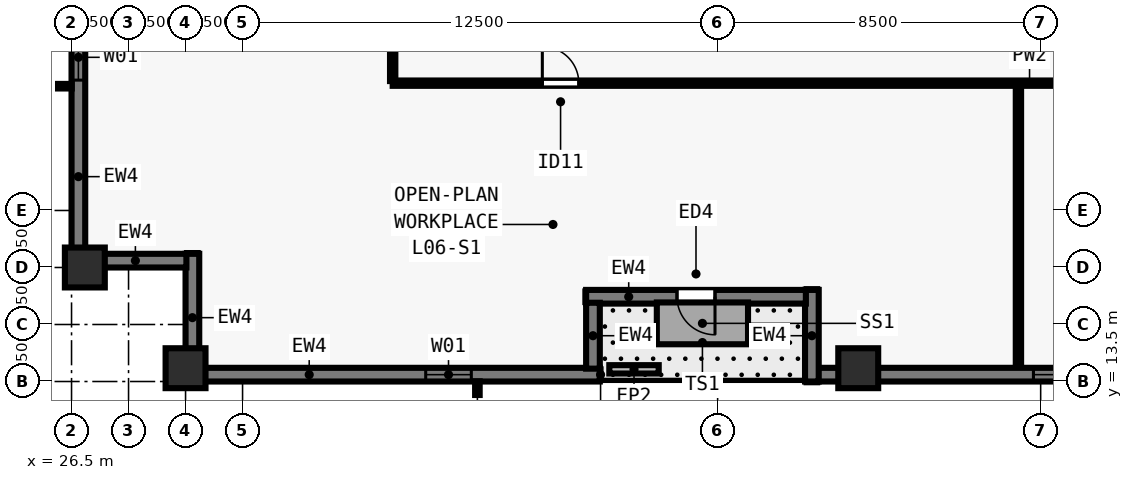
"""IFC4 building model, lengths in metres.
Left out: names, types, materials, properties, quantities, classifications, styles, units other than length and angle.
Written with IfcOpenShell. Run it as: python <this file> out.ifc"""

import sys

from ifc_helpers import new_model, si_unit, direction, frame, frame_2d, origin, origin_2d, place, context, subcontext, project, spatial, rectangle, extrude, element, fill, save


model = new_model("IFC4")
c1 = context("Model", 3, precision=1e-05, world=origin(), true_north=direction((0.0, 1.0)))
c2 = subcontext(c1, "Body", "Model", "MODEL_VIEW")
j1 = project(units=[si_unit("LENGTHUNIT", "METRE"), si_unit("PLANEANGLEUNIT", "RADIAN")], contexts=[c1])
p1 = place(None, origin())
s1 = spatial("IfcSite", under=j1, at=p1, CompositionType="ELEMENT")
p2 = place(p1, origin())
s2 = spatial("IfcBuilding", under=s1, at=p2, CompositionType="ELEMENT")
p3 = place(p2, frame((0.0, 0.0, 27.0)))
s3 = spatial("IfcBuildingStorey", under=s2, at=p3, CompositionType="ELEMENT", Elevation=27.0)
for number, where, z_axis, x_axis in (
    (1, (29.5, 13.85, 0.0), (0.0, 0.0, 1.0), (1.0, 0.0, 0.0)),
    (2, (47.2, 13.85, 0.0), (0.0, 0.0, 1.0), (1.0, 0.0, 0.0)),
    (3, (26.85, 16.5, 0.0), (0.0, 0.0, 1.0), (0.0, 1.0, 0.0)),
):
    element("IfcColumn", number, at=place(p3, frame(where, z_axis=z_axis, x_axis=x_axis)), inside=s3, PredefinedType="COLUMN", context=c2, shape_type="SweptSolid", body=[
        extrude(rectangle(XDim=1.05, YDim=1.05, at=origin_2d()), origin(), (0.0, 0.0, 1.0), 3.5),
    ])
p4 = place(p3, frame((40.4, 13.68, 0.0), z_axis=(0.0, 0.0, 1.0), x_axis=(-1.0, 0.0, 0.0)))
e4 = element("IfcWall", 4, at=p4, inside=s3, PredefinedType="SOLIDWALL", context=c2, shape_type="SweptSolid", body=[
    extrude(rectangle(XDim=10.562, YDim=0.36, at=frame_2d((5.281, 0.0))), origin(), (0.0, 0.0, 1.0), 3.28),
])
p5 = place(p4, frame((3.381, 0.0, 0.8)))
e5 = element("IfcOpeningElement", 5, at=p5, cuts=e4, PredefinedType="OPENING", context=c2, shape_type="SweptSolid", body=[
    extrude(rectangle(XDim=1.2, YDim=1.544, at=frame_2d((0.6, 0.772))), frame((0.0, 0.19, 0.0), z_axis=(0.0, -1.0, 0.0), x_axis=(1.0, 0.0, 0.0)), (0.0, 0.0, 1.0), 0.38),
])
p6 = place(p3, frame((29.68, 13.5, 0.0), z_axis=(0.0, 0.0, 1.0), x_axis=(0.0, 1.0, 0.0)))
e6 = element("IfcWall", 6, at=p6, inside=s3, PredefinedType="SOLIDWALL", context=c2, shape_type="SweptSolid", body=[
    extrude(rectangle(XDim=3.36, YDim=0.36, at=frame_2d((1.68, 0.0))), origin(), (0.0, 0.0, 1.0), 3.28),
])
p7 = place(p3, frame((29.522, 16.68, 0.0), z_axis=(0.0, 0.0, 1.0), x_axis=(-1.0, 0.0, 0.0)))
e7 = element("IfcWall", 7, at=p7, inside=s3, PredefinedType="SOLIDWALL", context=c2, shape_type="SweptSolid", body=[
    extrude(rectangle(XDim=2.684, YDim=0.36, at=frame_2d((1.342, 0.0))), origin(), (0.0, 0.0, 1.0), 3.28),
])
p8 = place(p3, frame((26.68, 16.5, 0.0), z_axis=(0.0, 0.0, 1.0), x_axis=(0.0, 1.0, 0.0)))
e8 = element("IfcWall", 8, at=p8, inside=s3, PredefinedType="SOLIDWALL", context=c2, shape_type="SweptSolid", body=[
    extrude(rectangle(XDim=44.662, YDim=0.36, at=frame_2d((22.331, 0.0))), origin(), (0.0, 0.0, 1.0), 3.28),
])
p9 = place(p8, frame((4.93, 0.0, 0.8)))
e9 = element("IfcOpeningElement", 9, at=p9, cuts=e8, PredefinedType="OPENING", context=c2, shape_type="SweptSolid", body=[
    extrude(rectangle(XDim=1.2, YDim=1.544, at=frame_2d((0.6, 0.772))), frame((0.0, 0.19, 0.0), z_axis=(0.0, -1.0, 0.0), x_axis=(1.0, 0.0, 0.0)), (0.0, 0.0, 1.0), 0.38),
])
p10 = place(p8, frame((8.14, 0.0, 0.8)))
e10 = element("IfcOpeningElement", 10, at=p10, cuts=e8, PredefinedType="OPENING", context=c2, shape_type="SweptSolid", body=[
    extrude(rectangle(XDim=1.5, YDim=1.544, at=frame_2d((0.75, 0.772))), frame((0.0, 0.19, 0.0), z_axis=(0.0, -1.0, 0.0), x_axis=(1.0, 0.0, 0.0)), (0.0, 0.0, 1.0), 0.38),
])
p11 = place(p8, frame((11.65, 0.0, 0.8)))
e11 = element("IfcOpeningElement", 11, at=p11, cuts=e8, PredefinedType="OPENING", context=c2, shape_type="SweptSolid", body=[
    extrude(rectangle(XDim=1.2, YDim=1.544, at=frame_2d((0.6, 0.772))), frame((0.0, 0.19, 0.0), z_axis=(0.0, -1.0, 0.0), x_axis=(1.0, 0.0, 0.0)), (0.0, 0.0, 1.0), 0.38),
])
p12 = place(p8, frame((14.411, 0.0, 0.8)))
e12 = element("IfcOpeningElement", 12, at=p12, cuts=e8, PredefinedType="OPENING", context=c2, shape_type="SweptSolid", body=[
    extrude(rectangle(XDim=1.5, YDim=1.544, at=frame_2d((0.75, 0.772))), frame((0.0, 0.19, 0.0), z_axis=(0.0, -1.0, 0.0), x_axis=(1.0, 0.0, 0.0)), (0.0, 0.0, 1.0), 0.38),
])
p13 = place(p8, frame((18.821, 0.0, 0.8)))
e13 = element("IfcOpeningElement", 13, at=p13, cuts=e8, PredefinedType="OPENING", context=c2, shape_type="SweptSolid", body=[
    extrude(rectangle(XDim=1.2, YDim=1.544, at=frame_2d((0.6, 0.772))), frame((0.0, 0.19, 0.0), z_axis=(0.0, -1.0, 0.0), x_axis=(1.0, 0.0, 0.0)), (0.0, 0.0, 1.0), 0.38),
])
p14 = place(p8, frame((21.581, 0.0, 0.8)))
e14 = element("IfcOpeningElement", 14, at=p14, cuts=e8, PredefinedType="OPENING", context=c2, shape_type="SweptSolid", body=[
    extrude(rectangle(XDim=1.5, YDim=1.544, at=frame_2d((0.75, 0.772))), frame((0.0, 0.19, 0.0), z_axis=(0.0, -1.0, 0.0), x_axis=(1.0, 0.0, 0.0)), (0.0, 0.0, 1.0), 0.38),
])
p15 = place(p8, frame((25.091, 0.0, 0.8)))
e15 = element("IfcOpeningElement", 15, at=p15, cuts=e8, PredefinedType="OPENING", context=c2, shape_type="SweptSolid", body=[
    extrude(rectangle(XDim=1.2, YDim=1.544, at=frame_2d((0.6, 0.772))), frame((0.0, 0.19, 0.0), z_axis=(0.0, -1.0, 0.0), x_axis=(1.0, 0.0, 0.0)), (0.0, 0.0, 1.0), 0.38),
])
p16 = place(p8, frame((29.151, 0.0, 0.8)))
e16 = element("IfcOpeningElement", 16, at=p16, cuts=e8, PredefinedType="OPENING", context=c2, shape_type="SweptSolid", body=[
    extrude(rectangle(XDim=1.5, YDim=1.544, at=frame_2d((0.75, 0.772))), frame((0.0, 0.19, 0.0), z_axis=(0.0, -1.0, 0.0), x_axis=(1.0, 0.0, 0.0)), (0.0, 0.0, 1.0), 0.38),
])
p17 = place(p8, frame((31.812, 0.0, 0.8)))
e17 = element("IfcOpeningElement", 17, at=p17, cuts=e8, PredefinedType="OPENING", context=c2, shape_type="SweptSolid", body=[
    extrude(rectangle(XDim=1.2, YDim=1.544, at=frame_2d((0.6, 0.772))), frame((0.0, 0.19, 0.0), z_axis=(0.0, -1.0, 0.0), x_axis=(1.0, 0.0, 0.0)), (0.0, 0.0, 1.0), 0.38),
])
p18 = place(p8, frame((35.022, 0.0, 0.8)))
e18 = element("IfcOpeningElement", 18, at=p18, cuts=e8, PredefinedType="OPENING", context=c2, shape_type="SweptSolid", body=[
    extrude(rectangle(XDim=1.5, YDim=1.544, at=frame_2d((0.75, 0.772))), frame((0.0, 0.19, 0.0), z_axis=(0.0, -1.0, 0.0), x_axis=(1.0, 0.0, 0.0)), (0.0, 0.0, 1.0), 0.38),
])
p19 = place(p8, frame((38.532, 0.0, 0.8)))
e19 = element("IfcOpeningElement", 19, at=p19, cuts=e8, PredefinedType="OPENING", context=c2, shape_type="SweptSolid", body=[
    extrude(rectangle(XDim=1.2, YDim=1.544, at=frame_2d((0.6, 0.772))), frame((0.0, 0.19, 0.0), z_axis=(0.0, -1.0, 0.0), x_axis=(1.0, 0.0, 0.0)), (0.0, 0.0, 1.0), 0.38),
])
p20 = place(p3, frame((74.5, 13.68, 0.0), z_axis=(0.0, 0.0, 1.0), x_axis=(-1.0, 0.0, 0.0)))
e20 = element("IfcWall", 20, at=p20, inside=s3, PredefinedType="SOLIDWALL", context=c2, shape_type="SweptSolid", body=[
    extrude(rectangle(XDim=28.362, YDim=0.36, at=frame_2d((14.181, 0.0))), origin(), (0.0, 0.0, 1.0), 3.28),
])
p21 = place(p20, frame((4.972, 0.0, 0.8)))
e21 = element("IfcOpeningElement", 21, at=p21, cuts=e20, PredefinedType="OPENING", context=c2, shape_type="SweptSolid", body=[
    extrude(rectangle(XDim=1.2, YDim=1.544, at=frame_2d((0.6, 0.772))), frame((0.0, 0.19, 0.0), z_axis=(0.0, -1.0, 0.0), x_axis=(1.0, 0.0, 0.0)), (0.0, 0.0, 1.0), 0.38),
])
p22 = place(p20, frame((8.265, 0.0, 0.8)))
e22 = element("IfcOpeningElement", 22, at=p22, cuts=e20, PredefinedType="OPENING", context=c2, shape_type="SweptSolid", body=[
    extrude(rectangle(XDim=1.5, YDim=1.544, at=frame_2d((0.75, 0.772))), frame((0.0, 0.19, 0.0), z_axis=(0.0, -1.0, 0.0), x_axis=(1.0, 0.0, 0.0)), (0.0, 0.0, 1.0), 0.38),
])
p23 = place(p20, frame((11.859, 0.0, 0.8)))
e23 = element("IfcOpeningElement", 23, at=p23, cuts=e20, PredefinedType="OPENING", context=c2, shape_type="SweptSolid", body=[
    extrude(rectangle(XDim=1.2, YDim=1.544, at=frame_2d((0.6, 0.772))), frame((0.0, 0.19, 0.0), z_axis=(0.0, -1.0, 0.0), x_axis=(1.0, 0.0, 0.0)), (0.0, 0.0, 1.0), 0.38),
])
p24 = place(p20, frame((15.153, 0.0, 0.8)))
e24 = element("IfcOpeningElement", 24, at=p24, cuts=e20, PredefinedType="OPENING", context=c2, shape_type="SweptSolid", body=[
    extrude(rectangle(XDim=1.5, YDim=1.544, at=frame_2d((0.75, 0.772))), frame((0.0, 0.19, 0.0), z_axis=(0.0, -1.0, 0.0), x_axis=(1.0, 0.0, 0.0)), (0.0, 0.0, 1.0), 0.38),
])
p25 = place(p20, frame((18.747, 0.0, 0.8)))
e25 = element("IfcOpeningElement", 25, at=p25, cuts=e20, PredefinedType="OPENING", context=c2, shape_type="SweptSolid", body=[
    extrude(rectangle(XDim=1.2, YDim=1.544, at=frame_2d((0.6, 0.772))), frame((0.0, 0.19, 0.0), z_axis=(0.0, -1.0, 0.0), x_axis=(1.0, 0.0, 0.0)), (0.0, 0.0, 1.0), 0.38),
])
p26 = place(p20, frame((21.19, 0.0, 0.8)))
e26 = element("IfcOpeningElement", 26, at=p26, cuts=e20, PredefinedType="OPENING", context=c2, shape_type="SweptSolid", body=[
    extrude(rectangle(XDim=1.5, YDim=1.544, at=frame_2d((0.75, 0.772))), frame((0.0, 0.19, 0.0), z_axis=(0.0, -1.0, 0.0), x_axis=(1.0, 0.0, 0.0)), (0.0, 0.0, 1.0), 0.38),
])
p27 = place(p3, frame((45.98, 13.5, 0.0), z_axis=(0.0, 0.0, 1.0), x_axis=(0.0, 1.0, 0.0)))
e27 = element("IfcWall", 27, at=p27, inside=s3, PredefinedType="SOLIDWALL", context=c2, shape_type="SweptSolid", body=[
    extrude(rectangle(XDim=2.41, YDim=0.36, at=frame_2d((1.205, 0.0))), origin(), (0.0, 0.0, 1.0), 3.28),
])
p28 = place(p3, frame((45.822, 15.73, 0.0), z_axis=(0.0, 0.0, 1.0), x_axis=(-1.0, 0.0, 0.0)))
e28 = element("IfcWall", 28, at=p28, inside=s3, PredefinedType="SOLIDWALL", context=c2, shape_type="SweptSolid", body=[
    extrude(rectangle(XDim=5.782, YDim=0.36, at=frame_2d((2.891, 0.0))), origin(), (0.0, 0.0, 1.0), 3.28),
])
p29 = place(p28, frame((2.391, 0.0, 0.0)))
e29 = element("IfcOpeningElement", 29, at=p29, cuts=e28, PredefinedType="OPENING", context=c2, shape_type="SweptSolid", body=[
    extrude(rectangle(XDim=1.0, YDim=2.15, at=frame_2d((0.5, 1.075))), frame((0.0, 0.19, 0.0), z_axis=(0.0, -1.0, 0.0), x_axis=(1.0, 0.0, 0.0)), (0.0, 0.0, 1.0), 0.38),
])
p30 = place(p3, frame((40.22, 15.572, 0.0), z_axis=(0.0, 0.0, 1.0), x_axis=(0.0, -1.0, 0.0)))
e30 = element("IfcWall", 30, at=p30, inside=s3, PredefinedType="SOLIDWALL", context=c2, shape_type="SweptSolid", body=[
    extrude(rectangle(XDim=1.734, YDim=0.36, at=frame_2d((0.867, 0.0))), origin(), (0.0, 0.0, 1.0), 3.28),
])
p31 = place(p3, frame((40.65, 13.82, 0.0), z_axis=(0.0, 0.0, 1.0), x_axis=(1.0, 0.0, 0.0)))
e31 = element("IfcWall", 31, at=p31, inside=s3, PredefinedType="PARAPET", context=c2, shape_type="SweptSolid", body=[
    extrude(rectangle(XDim=1.3, YDim=0.22, at=frame_2d((0.65, 0.0))), origin(), (0.0, 0.0, 1.0), 0.55),
])
p32 = place(p3, frame((34.95, 21.35, 0.0), z_axis=(0.0, 0.0, 1.0), x_axis=(1.0, 0.0, 0.0)))
e32 = element("IfcWall", 32, at=p32, inside=s3, PredefinedType="PARTITIONING", context=c2, shape_type="SweptSolid", body=[
    extrude(rectangle(XDim=34.1, YDim=0.14, at=frame_2d((17.05, 0.0))), origin(), (0.0, 0.0, 1.0), 3.28),
])
p33 = place(p32, frame((3.938, 0.0, 0.0)))
e33 = element("IfcOpeningElement", 33, at=p33, cuts=e32, PredefinedType="OPENING", context=c2, shape_type="SweptSolid", body=[
    extrude(rectangle(XDim=0.96, YDim=2.12, at=frame_2d((0.48, 1.06))), frame((0.0, 0.08, 0.0), z_axis=(0.0, -1.0, 0.0), x_axis=(1.0, 0.0, 0.0)), (0.0, 0.0, 1.0), 0.16),
])
p34 = place(p32, frame((28.617, 0.0, 0.0)))
e34 = element("IfcOpeningElement", 34, at=p34, cuts=e32, PredefinedType="OPENING", context=c2, shape_type="SweptSolid", body=[
    extrude(rectangle(XDim=0.96, YDim=2.12, at=frame_2d((0.48, 1.06))), frame((0.0, 0.08, 0.0), z_axis=(0.0, -1.0, 0.0), x_axis=(1.0, 0.0, 0.0)), (0.0, 0.0, 1.0), 0.16),
])
p35 = place(p3, frame((34.95, 21.405, 0.0), z_axis=(0.0, 0.0, 1.0), x_axis=(0.0, 1.0, 0.0)))
e35 = element("IfcWall", 35, at=p35, inside=s3, PredefinedType="PARTITIONING", context=c2, shape_type="SweptSolid", body=[
    extrude(rectangle(XDim=35.19, YDim=0.14, at=frame_2d((17.595, 0.0))), origin(), (0.0, 0.0, 1.0), 3.28),
])
p36 = place(p35, frame((5.21, 0.0, 0.0)))
e36 = element("IfcOpeningElement", 36, at=p36, cuts=e35, PredefinedType="OPENING", context=c2, shape_type="SweptSolid", body=[
    extrude(rectangle(XDim=0.96, YDim=2.12, at=frame_2d((0.48, 1.06))), frame((0.0, 0.08, 0.0), z_axis=(0.0, -1.0, 0.0), x_axis=(1.0, 0.0, 0.0)), (0.0, 0.0, 1.0), 0.16),
])
p37 = place(p35, frame((17.052, 0.0, 0.0)))
e37 = element("IfcOpeningElement", 37, at=p37, cuts=e35, PredefinedType="OPENING", context=c2, shape_type="SweptSolid", body=[
    extrude(rectangle(XDim=0.96, YDim=2.12, at=frame_2d((0.48, 1.06))), frame((0.0, 0.08, 0.0), z_axis=(0.0, -1.0, 0.0), x_axis=(1.0, 0.0, 0.0)), (0.0, 0.0, 1.0), 0.16),
])
p38 = place(p35, frame((28.957, 0.0, 0.0)))
e38 = element("IfcOpeningElement", 38, at=p38, cuts=e35, PredefinedType="OPENING", context=c2, shape_type="SweptSolid", body=[
    extrude(rectangle(XDim=0.96, YDim=2.12, at=frame_2d((0.48, 1.06))), frame((0.0, 0.08, 0.0), z_axis=(0.0, -1.0, 0.0), x_axis=(1.0, 0.0, 0.0)), (0.0, 0.0, 1.0), 0.16),
])
p39 = place(p3, frame((51.415, 13.92, 0.0), z_axis=(0.0, 0.0, 1.0), x_axis=(0.0, 1.0, 0.0)))
e39 = element("IfcWall", 39, at=p39, inside=s3, PredefinedType="PARTITIONING", context=c2, shape_type="SweptSolid", body=[
    extrude(rectangle(XDim=7.33, YDim=0.14, at=frame_2d((3.665, 0.0))), origin(), (0.0, 0.0, 1.0), 2.849),
])
p40 = place(p5, origin())
e40 = element("IfcWindow", 40, at=p40, inside=s3, PartitioningType="SINGLE_PANEL", PredefinedType="WINDOW", context=c2, shape_type="SweptSolid", body=[
    extrude(rectangle(XDim=1.2, YDim=1.544, at=frame_2d((0.6, 0.772))), frame((0.0, -0.05, 0.0), z_axis=(0.0, -1.0, 0.0), x_axis=(1.0, 0.0, 0.0)), (0.0, 0.0, 1.0), 0.06),
])
fill(e5, e40)
p41 = place(p9, origin())
e41 = element("IfcWindow", 41, at=p41, inside=s3, PartitioningType="SINGLE_PANEL", PredefinedType="WINDOW", context=c2, shape_type="SweptSolid", body=[
    extrude(rectangle(XDim=1.2, YDim=1.544, at=frame_2d((0.6, 0.772))), frame((0.0, -0.05, 0.0), z_axis=(0.0, -1.0, 0.0), x_axis=(1.0, 0.0, 0.0)), (0.0, 0.0, 1.0), 0.06),
])
fill(e9, e41)
p42 = place(p26, origin())
e42 = element("IfcWindow", 42, at=p42, inside=s3, PartitioningType="SINGLE_PANEL", PredefinedType="WINDOW", context=c2, shape_type="SweptSolid", body=[
    extrude(rectangle(XDim=1.5, YDim=1.544, at=frame_2d((0.75, 0.772))), frame((0.0, -0.05, 0.0), z_axis=(0.0, -1.0, 0.0), x_axis=(1.0, 0.0, 0.0)), (0.0, 0.0, 1.0), 0.06),
])
fill(e26, e42)
p43 = place(p29, origin())
e43 = element("IfcDoor", 43, at=p43, inside=s3, OperationType="SINGLE_SWING_LEFT", PredefinedType="DOOR", context=c2, shape_type="SweptSolid", body=[
    extrude(rectangle(XDim=1.0, YDim=2.15, at=frame_2d((0.5, 1.075))), frame((0.0, 0.025, 0.0), z_axis=(0.0, -1.0, 0.0), x_axis=(1.0, 0.0, 0.0)), (0.0, 0.0, 1.0), 0.05),
])
fill(e29, e43)
p44 = place(p33, origin())
e44 = element("IfcDoor", 44, at=p44, inside=s3, OperationType="SINGLE_SWING_LEFT", PredefinedType="DOOR", context=c2, shape_type="SweptSolid", body=[
    extrude(rectangle(XDim=0.96, YDim=2.12, at=frame_2d((0.48, 1.06))), frame((0.0, 0.025, 0.0), z_axis=(0.0, -1.0, 0.0), x_axis=(1.0, 0.0, 0.0)), (0.0, 0.0, 1.0), 0.05),
])
fill(e33, e44)
save(model, sys.argv[1])
